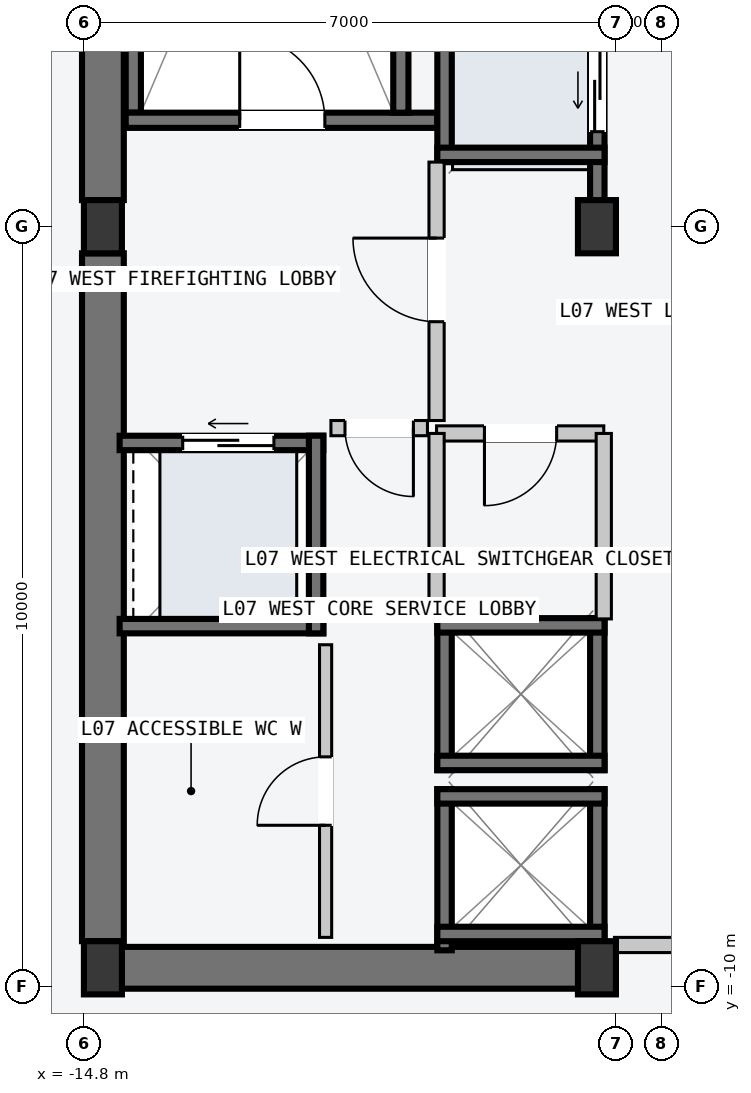
"""IFC4 building model, lengths in metres.
Left out: names, types, materials, properties, quantities, classifications, styles, units other than length and angle.
Written with IfcOpenShell. Run it as: python <this file> out.ifc"""

import sys

from ifc_helpers import new_model, si_unit, direction, frame, frame_2d, origin, origin_2d, place, context, subcontext, project, spatial, rectangle, i_section, extrude, element, fill, save


model = new_model("IFC4")
c1 = context("Model", 3, precision=1e-05, world=origin(), true_north=direction((0.0, 1.0)))
c2 = subcontext(c1, "Body", "Model", "MODEL_VIEW")
j1 = project(units=[si_unit("LENGTHUNIT", "METRE"), si_unit("PLANEANGLEUNIT", "RADIAN")], contexts=[c1])
p1 = place(None, origin())
s1 = spatial("IfcSite", under=j1, at=p1, CompositionType="ELEMENT")
p2 = place(p1, origin())
s2 = spatial("IfcBuilding", under=s1, at=p2, CompositionType="ELEMENT")
p3 = place(p2, frame((0.0, 0.0, 31.2)))
s3 = spatial("IfcBuildingStorey", under=s2, at=p3, CompositionType="ELEMENT", Elevation=31.2)
p4 = place(p3, frame((-14.53, -9.75, -0.2), z_axis=(0.0, 0.0, 1.0), x_axis=(1.0, 0.0, 0.0)))
e1 = element("IfcWall", 1, at=p4, inside=s3, PredefinedType="SHEAR", context=c2, shape_type="SweptSolid", body=[
    extrude(rectangle(XDim=6.46, YDim=0.55, at=frame_2d((3.23, 0.0))), origin(), (0.0, 0.0, 1.0), 3.6),
])
for number, where, z_axis, x_axis in (
    (2, (-14.55, -9.4, -0.2), (0.0, 0.0, 1.0), (0.0, 1.0, 0.0)),
    (3, (-14.55, 0.35, -0.2), (0.0, 0.0, 1.0), (0.0, 1.0, 0.0)),
):
    element("IfcWall", number, at=place(p3, frame(where, z_axis=z_axis, x_axis=x_axis)), inside=s3, PredefinedType="SHEAR", context=c2, shape_type="SweptSolid", body=[
        extrude(rectangle(XDim=9.05, YDim=0.55, at=frame_2d((4.525, 0.0))), origin(), (0.0, 0.0, 1.0), 3.6),
    ])
p5 = place(p3, frame((-14.15, 1.5, -0.2), z_axis=(0.0, 0.0, 1.0), x_axis=(0.0, 1.0, 0.0)))
e4 = element("IfcWall", 4, at=p5, inside=s3, PredefinedType="SOLIDWALL", context=c2, shape_type="SweptSolid", body=[
    extrude(rectangle(XDim=7.8, YDim=0.2, at=frame_2d((3.9, 0.0))), origin(), (0.0, 0.0, 1.0), 3.6),
])
p6 = place(p3, frame((-14.25, 1.4, -0.2), z_axis=(0.0, 0.0, 1.0), x_axis=(1.0, 0.0, 0.0)))
e5 = element("IfcWall", 5, at=p6, inside=s3, PredefinedType="SOLIDWALL", context=c2, shape_type="SweptSolid", body=[
    extrude(rectangle(XDim=4.1, YDim=0.2, at=frame_2d((2.05, 0.0))), origin(), (0.0, 0.0, 1.0), 3.6),
])
p7 = place(p6, frame((1.5, 0.0, 0.2)))
e6 = element("IfcOpeningElement", 6, at=p7, cuts=e5, PredefinedType="OPENING", context=c2, shape_type="SweptSolid", body=[
    extrude(rectangle(XDim=1.12, YDim=2.18, at=frame_2d((0.56, 1.09))), frame((0.0, 0.11, 0.0), z_axis=(0.0, -1.0, 0.0), x_axis=(1.0, 0.0, 0.0)), (0.0, 0.0, 1.0), 0.22),
])
p8 = place(p3, frame((-10.63, 1.5, -0.2), z_axis=(0.0, 0.0, 1.0), x_axis=(0.0, 1.0, 0.0)))
e7 = element("IfcWall", 7, at=p8, inside=s3, PredefinedType="SOLIDWALL", context=c2, shape_type="SweptSolid", body=[
    extrude(rectangle(XDim=7.8, YDim=0.2, at=frame_2d((3.9, 0.0))), origin(), (0.0, 0.0, 1.0), 3.6),
])
for number, where, z_axis, x_axis in (
    (8, (-14.55, -9.75, 0.0), (0.0, 0.0, 1.0), (1.0, 0.0, 0.0)),
    (9, (-14.55, 0.0, 0.0), (0.0, 0.0, 1.0), (1.0, 0.0, 0.0)),
    (10, (-8.05, -9.75, 0.0), (0.0, 0.0, 1.0), (1.0, 0.0, 0.0)),
    (11, (-8.05, 0.0, 0.0), (0.0, 0.0, 1.0), (1.0, 0.0, 0.0)),
):
    element("IfcColumn", number, at=place(p3, frame(where, z_axis=z_axis, x_axis=x_axis)), inside=s3, PredefinedType="COLUMN", context=c2, shape_type="SweptSolid", body=[
        extrude(i_section(OverallWidth=0.5, OverallDepth=0.7, WebThickness=0.028, FlangeThickness=0.045, at=origin_2d()), origin(), (0.0, 0.0, 1.0), 3.6),
    ])
p9 = place(p3, frame((-8.045, 0.21, -0.2), z_axis=(0.0, 0.0, 1.0), x_axis=(0.0, 1.0, 0.0)))
e12 = element("IfcWall", 12, at=p9, inside=s3, PredefinedType="SOLIDWALL", context=c2, shape_type="SweptSolid", body=[
    extrude(rectangle(XDim=2.54, YDim=0.19, at=frame_2d((1.27, 0.0))), origin(), (0.0, 0.0, 1.0), 3.6),
])
p10 = place(p9, frame((1.04, 0.0, 0.2)))
e13 = element("IfcOpeningElement", 13, at=p10, cuts=e12, PredefinedType="OPENING", context=c2, shape_type="SweptSolid", body=[
    extrude(rectangle(XDim=1.1, YDim=2.2, at=frame_2d((0.55, 1.1))), frame((0.0, 0.105, 0.0), z_axis=(0.0, -1.0, 0.0), x_axis=(1.0, 0.0, 0.0)), (0.0, 0.0, 1.0), 0.21),
])
p11 = place(p3, frame((-10.055, 0.85, -0.2), z_axis=(0.0, 0.0, 1.0), x_axis=(0.0, 1.0, 0.0)))
e14 = element("IfcWall", 14, at=p11, inside=s3, PredefinedType="SOLIDWALL", context=c2, shape_type="SweptSolid", body=[
    extrude(rectangle(XDim=1.9, YDim=0.19, at=frame_2d((0.95, 0.0))), origin(), (0.0, 0.0, 1.0), 3.6),
])
p12 = place(p3, frame((-10.15, 0.945, -0.2), z_axis=(0.0, 0.0, 1.0), x_axis=(1.0, 0.0, 0.0)))
e15 = element("IfcWall", 15, at=p12, inside=s3, PredefinedType="SOLIDWALL", context=c2, shape_type="SweptSolid", body=[
    extrude(rectangle(XDim=2.2, YDim=0.19, at=frame_2d((1.1, 0.0))), origin(), (0.0, 0.0, 1.0), 3.6),
])
for number, where, z_axis, x_axis in (
    (16, (-8.045, -9.52, -0.2), (0.0, 0.0, 1.0), (0.0, 1.0, 0.0)),
    (17, (-10.055, -9.52, -0.2), (0.0, 0.0, 1.0), (0.0, 1.0, 0.0)),
):
    element("IfcWall", number, at=place(p3, frame(where, z_axis=z_axis, x_axis=x_axis)), inside=s3, PredefinedType="SOLIDWALL", context=c2, shape_type="SweptSolid", body=[
        extrude(rectangle(XDim=2.12, YDim=0.19, at=frame_2d((1.06, 0.0))), origin(), (0.0, 0.0, 1.0), 3.6),
    ])
for number, where, z_axis, x_axis in (
    (18, (-10.15, -7.495, -0.2), (0.0, 0.0, 1.0), (1.0, 0.0, 0.0)),
    (19, (-10.15, -9.305, -0.2), (0.0, 0.0, 1.0), (1.0, 0.0, 0.0)),
):
    element("IfcWall", number, at=place(p3, frame(where, z_axis=z_axis, x_axis=x_axis)), inside=s3, PredefinedType="SOLIDWALL", context=c2, shape_type="SweptSolid", body=[
        extrude(rectangle(XDim=2.2, YDim=0.19, at=frame_2d((1.1, 0.0))), origin(), (0.0, 0.0, 1.0), 3.6),
    ])
for number, where, z_axis, x_axis in (
    (20, (-8.045, -7.15, -0.2), (0.0, 0.0, 1.0), (0.0, 1.0, 0.0)),
    (21, (-10.055, -7.15, -0.2), (0.0, 0.0, 1.0), (0.0, 1.0, 0.0)),
):
    element("IfcWall", number, at=place(p3, frame(where, z_axis=z_axis, x_axis=x_axis)), inside=s3, PredefinedType="SOLIDWALL", context=c2, shape_type="SweptSolid", body=[
        extrude(rectangle(XDim=2.0, YDim=0.19, at=frame_2d((1.0, 0.0))), origin(), (0.0, 0.0, 1.0), 3.6),
    ])
for number, where, z_axis, x_axis in (
    (22, (-10.15, -5.245, -0.2), (0.0, 0.0, 1.0), (1.0, 0.0, 0.0)),
    (23, (-10.15, -7.055, -0.2), (0.0, 0.0, 1.0), (1.0, 0.0, 0.0)),
):
    element("IfcWall", number, at=place(p3, frame(where, z_axis=z_axis, x_axis=x_axis)), inside=s3, PredefinedType="SOLIDWALL", context=c2, shape_type="SweptSolid", body=[
        extrude(rectangle(XDim=2.2, YDim=0.19, at=frame_2d((1.1, 0.0))), origin(), (0.0, 0.0, 1.0), 3.6),
    ])
p13 = place(p3, frame((-14.33, -2.845, -0.2), z_axis=(0.0, 0.0, 1.0), x_axis=(1.0, 0.0, 0.0)))
e24 = element("IfcWall", 24, at=p13, inside=s3, PredefinedType="SOLIDWALL", context=c2, shape_type="SweptSolid", body=[
    extrude(rectangle(XDim=2.68, YDim=0.19, at=frame_2d((1.34, 0.0))), origin(), (0.0, 0.0, 1.0), 3.6),
])
p14 = place(p13, frame((0.83, 0.0, 0.2)))
e25 = element("IfcOpeningElement", 25, at=p14, cuts=e24, PredefinedType="OPENING", context=c2, shape_type="SweptSolid", body=[
    extrude(rectangle(XDim=1.2, YDim=2.2, at=frame_2d((0.6, 1.1))), frame((0.0, 0.105, 0.0), z_axis=(0.0, -1.0, 0.0), x_axis=(1.0, 0.0, 0.0)), (0.0, 0.0, 1.0), 0.21),
])
p15 = place(p3, frame((-14.33, -5.255, -0.2), z_axis=(0.0, 0.0, 1.0), x_axis=(1.0, 0.0, 0.0)))
e26 = element("IfcWall", 26, at=p15, inside=s3, PredefinedType="SOLIDWALL", context=c2, shape_type="SweptSolid", body=[
    extrude(rectangle(XDim=2.68, YDim=0.19, at=frame_2d((1.34, 0.0))), origin(), (0.0, 0.0, 1.0), 3.6),
])
p16 = place(p3, frame((-11.745, -5.35, -0.2), z_axis=(0.0, 0.0, 1.0), x_axis=(0.0, 1.0, 0.0)))
e27 = element("IfcWall", 27, at=p16, inside=s3, PredefinedType="SOLIDWALL", context=c2, shape_type="SweptSolid", body=[
    extrude(rectangle(XDim=2.6, YDim=0.19, at=frame_2d((1.3, 0.0))), origin(), (0.0, 0.0, 1.0), 3.6),
])
p17 = place(p3, frame((-6.02, -9.45, 0.0), z_axis=(0.0, 0.0, 1.0), x_axis=(-1.0, 0.0, 0.0)))
e28 = element("IfcWall", 28, at=p17, inside=s3, PredefinedType="PARTITIONING", context=c2, shape_type="SweptSolid", body=[
    extrude(rectangle(XDim=1.8, YDim=0.2, at=frame_2d((0.9, 0.0))), origin(), (0.0, 0.0, 1.0), 3.4),
])
p18 = place(p3, frame((-10.16, -2.55, 0.0), z_axis=(0.0, 0.0, 1.0), x_axis=(0.0, 1.0, 0.0)))
e29 = element("IfcWall", 29, at=p18, inside=s3, PredefinedType="PARTITIONING", context=c2, shape_type="SweptSolid", body=[
    extrude(rectangle(XDim=3.4, YDim=0.2, at=frame_2d((1.7, 0.0))), origin(), (0.0, 0.0, 1.0), 3.4),
])
p19 = place(p18, frame((1.3, 0.0, 0.0)))
e30 = element("IfcOpeningElement", 30, at=p19, cuts=e29, PredefinedType="OPENING", context=c2, shape_type="SweptSolid", body=[
    extrude(rectangle(XDim=1.1, YDim=2.15, at=frame_2d((0.55, 1.075))), frame((0.0, 0.11, 0.0), z_axis=(0.0, -1.0, 0.0), x_axis=(1.0, 0.0, 0.0)), (0.0, 0.0, 1.0), 0.22),
])
p20 = place(p3, frame((-10.28, -2.65, 0.0), z_axis=(0.0, 0.0, 1.0), x_axis=(-1.0, 0.0, 0.0)))
e31 = element("IfcWall", 31, at=p20, inside=s3, PredefinedType="PARTITIONING", context=c2, shape_type="SweptSolid", body=[
    extrude(rectangle(XDim=1.27, YDim=0.2, at=frame_2d((0.635, 0.0))), origin(), (0.0, 0.0, 1.0), 3.4),
])
p21 = place(p20, frame((0.185, 0.0, 0.0)))
e32 = element("IfcOpeningElement", 32, at=p21, cuts=e31, PredefinedType="OPENING", context=c2, shape_type="SweptSolid", body=[
    extrude(rectangle(XDim=0.9, YDim=2.15, at=frame_2d((0.45, 1.075))), frame((0.0, 0.11, 0.0), z_axis=(0.0, -1.0, 0.0), x_axis=(1.0, 0.0, 0.0)), (0.0, 0.0, 1.0), 0.22),
])
p22 = place(p3, frame((-7.96, -2.72, 0.0), z_axis=(0.0, 0.0, 1.0), x_axis=(-1.0, 0.0, 0.0)))
e33 = element("IfcWall", 33, at=p22, inside=s3, PredefinedType="PARTITIONING", context=c2, shape_type="SweptSolid", body=[
    extrude(rectangle(XDim=2.2, YDim=0.2, at=frame_2d((1.1, 0.0))), origin(), (0.0, 0.0, 1.0), 3.4),
])
p23 = place(p22, frame((0.62, 0.0, 0.0)))
e34 = element("IfcOpeningElement", 34, at=p23, cuts=e33, PredefinedType="OPENING", context=c2, shape_type="SweptSolid", body=[
    extrude(rectangle(XDim=0.95, YDim=2.1, at=frame_2d((0.475, 1.05))), frame((0.0, 0.11, 0.0), z_axis=(0.0, -1.0, 0.0), x_axis=(1.0, 0.0, 0.0)), (0.0, 0.0, 1.0), 0.22),
])
for number, where, z_axis, x_axis in (
    (35, (-7.96, -5.16, 0.0), (0.0, 0.0, 1.0), (0.0, 1.0, 0.0)),
    (36, (-10.16, -5.16, 0.0), (0.0, 0.0, 1.0), (0.0, 1.0, 0.0)),
):
    element("IfcWall", number, at=place(p3, frame(where, z_axis=z_axis, x_axis=x_axis)), inside=s3, PredefinedType="PARTITIONING", context=c2, shape_type="SweptSolid", body=[
        extrude(rectangle(XDim=2.44, YDim=0.2, at=frame_2d((1.22, 0.0))), origin(), (0.0, 0.0, 1.0), 3.4),
    ])
p24 = place(p3, frame((-11.62, -9.35, 0.0), z_axis=(0.0, 0.0, 1.0), x_axis=(0.0, 1.0, 0.0)))
e37 = element("IfcWall", 37, at=p24, inside=s3, PredefinedType="PARTITIONING", context=c2, shape_type="SweptSolid", body=[
    extrude(rectangle(XDim=3.85, YDim=0.16, at=frame_2d((1.925, 0.0))), origin(), (0.0, 0.0, 1.0), 3.4),
])
p25 = place(p24, frame((1.475, 0.0, 0.0)))
e38 = element("IfcOpeningElement", 38, at=p25, cuts=e37, PredefinedType="OPENING", context=c2, shape_type="SweptSolid", body=[
    extrude(rectangle(XDim=0.9, YDim=2.15, at=frame_2d((0.45, 1.075))), frame((0.0, 0.09, 0.0), z_axis=(0.0, -1.0, 0.0), x_axis=(1.0, 0.0, 0.0)), (0.0, 0.0, 1.0), 0.18),
])
p26 = place(p7, origin())
e39 = element("IfcDoor", 39, at=p26, inside=s3, OperationType="SINGLE_SWING_LEFT", PredefinedType="DOOR", context=c2, shape_type="SweptSolid", body=[
    extrude(rectangle(XDim=1.12, YDim=2.18, at=frame_2d((0.56, 1.09))), frame((0.0, 0.025, 0.0), z_axis=(0.0, -1.0, 0.0), x_axis=(1.0, 0.0, 0.0)), (0.0, 0.0, 1.0), 0.05),
])
fill(e6, e39)
p27 = place(p10, origin())
e40 = element("IfcDoor", 40, at=p27, inside=s3, OperationType="SLIDING_TO_LEFT", PredefinedType="DOOR", context=c2, shape_type="SweptSolid", body=[
    extrude(rectangle(XDim=1.1, YDim=2.2, at=frame_2d((0.55, 1.1))), frame((0.0, 0.025, 0.0), z_axis=(0.0, -1.0, 0.0), x_axis=(1.0, 0.0, 0.0)), (0.0, 0.0, 1.0), 0.05),
])
fill(e13, e40)
p28 = place(p14, origin())
e41 = element("IfcDoor", 41, at=p28, inside=s3, OperationType="SLIDING_TO_LEFT", PredefinedType="DOOR", context=c2, shape_type="SweptSolid", body=[
    extrude(rectangle(XDim=1.2, YDim=2.2, at=frame_2d((0.6, 1.1))), frame((0.0, 0.025, 0.0), z_axis=(0.0, -1.0, 0.0), x_axis=(1.0, 0.0, 0.0)), (0.0, 0.0, 1.0), 0.05),
])
fill(e25, e41)
p29 = place(p19, origin())
e42 = element("IfcDoor", 42, at=p29, inside=s3, OperationType="SINGLE_SWING_RIGHT", PredefinedType="DOOR", context=c2, shape_type="SweptSolid", body=[
    extrude(rectangle(XDim=1.1, YDim=2.15, at=frame_2d((0.55, 1.075))), frame((0.0, 0.025, 0.0), z_axis=(0.0, -1.0, 0.0), x_axis=(1.0, 0.0, 0.0)), (0.0, 0.0, 1.0), 0.05),
])
fill(e30, e42)
p30 = place(p21, origin())
e43 = element("IfcDoor", 43, at=p30, inside=s3, OperationType="SINGLE_SWING_LEFT", PredefinedType="DOOR", context=c2, shape_type="SweptSolid", body=[
    extrude(rectangle(XDim=0.9, YDim=2.15, at=frame_2d((0.45, 1.075))), frame((0.0, 0.025, 0.0), z_axis=(0.0, -1.0, 0.0), x_axis=(1.0, 0.0, 0.0)), (0.0, 0.0, 1.0), 0.05),
])
fill(e32, e43)
p31 = place(p23, origin())
e44 = element("IfcDoor", 44, at=p31, inside=s3, OperationType="SINGLE_SWING_RIGHT", PredefinedType="DOOR", context=c2, shape_type="SweptSolid", body=[
    extrude(rectangle(XDim=0.95, YDim=2.1, at=frame_2d((0.475, 1.05))), frame((0.0, 0.025, 0.0), z_axis=(0.0, -1.0, 0.0), x_axis=(1.0, 0.0, 0.0)), (0.0, 0.0, 1.0), 0.05),
])
fill(e34, e44)
p32 = place(p25, origin())
e45 = element("IfcDoor", 45, at=p32, inside=s3, OperationType="SINGLE_SWING_LEFT", PredefinedType="DOOR", context=c2, shape_type="SweptSolid", body=[
    extrude(rectangle(XDim=0.9, YDim=2.15, at=frame_2d((0.45, 1.075))), frame((0.0, 0.025, 0.0), z_axis=(0.0, -1.0, 0.0), x_axis=(1.0, 0.0, 0.0)), (0.0, 0.0, 1.0), 0.05),
])
fill(e38, e45)
save(model, sys.argv[1])
